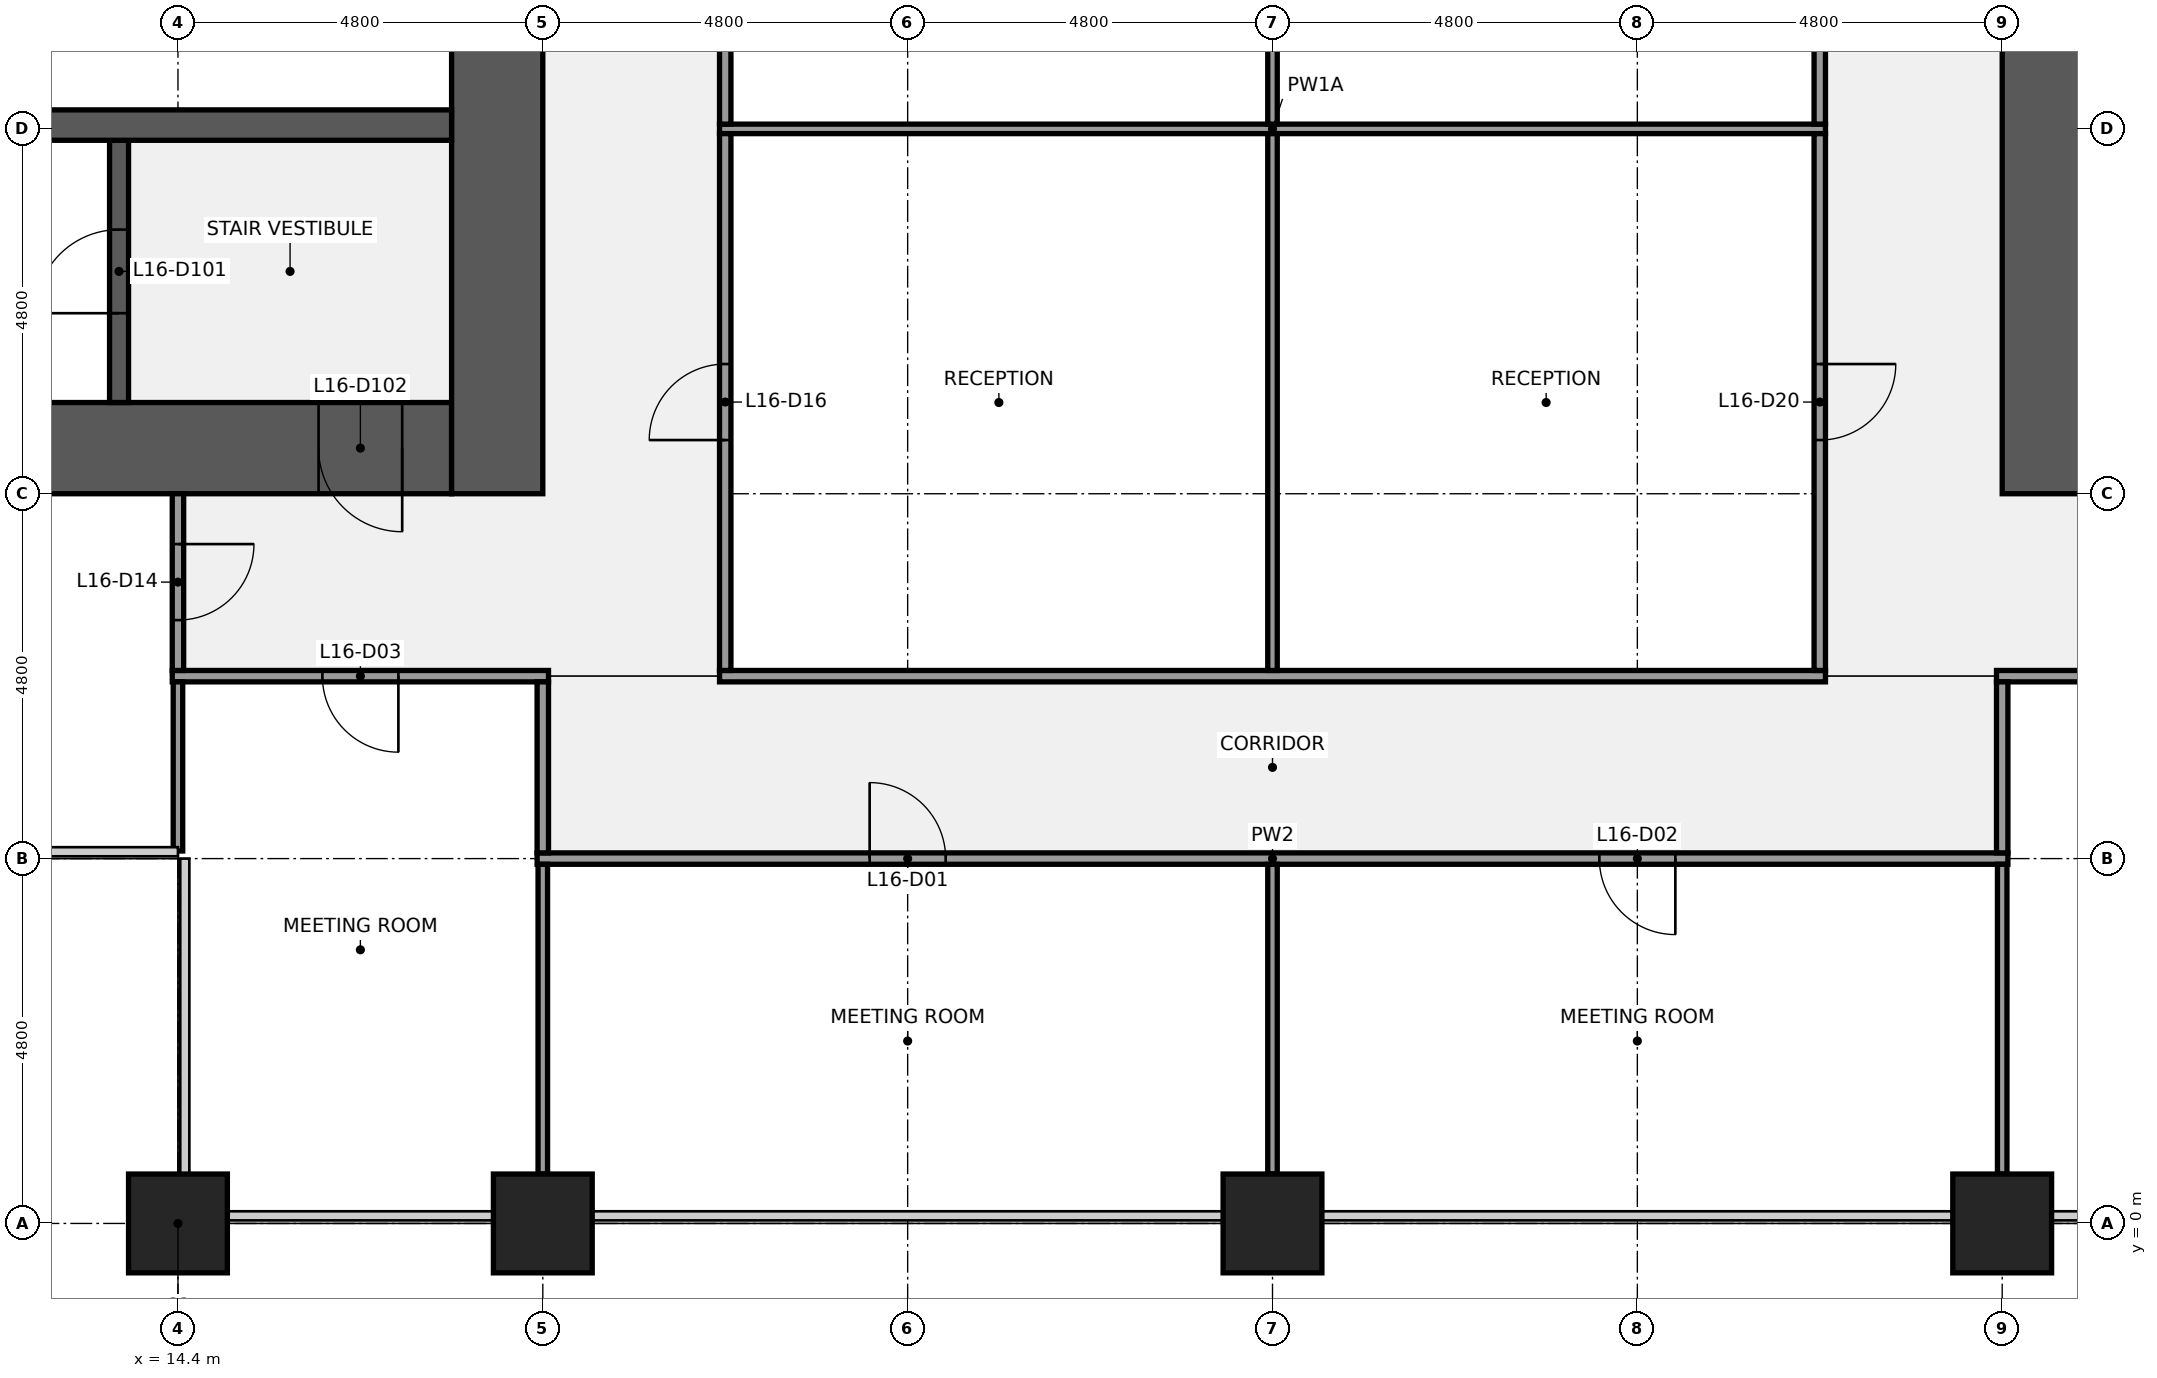
"""IFC4 building model, lengths in metres.
Left out: names, types, materials, properties, quantities, classifications, styles, units other than length and angle.
Written with IfcOpenShell. Run it as: python <this file> out.ifc"""

import sys

from ifc_helpers import new_model, si_unit, direction, frame, frame_2d, origin, origin_2d, place, context, subcontext, project, spatial, rectangle, extrude, element, fill, save


model = new_model("IFC4")
c1 = context("Model", 3, precision=1e-05, world=origin(), true_north=direction((0.0, 1.0)))
c2 = subcontext(c1, "Body", "Model", "MODEL_VIEW")
j1 = project(units=[si_unit("LENGTHUNIT", "METRE"), si_unit("PLANEANGLEUNIT", "RADIAN")], contexts=[c1])
p1 = place(None, origin())
s1 = spatial("IfcSite", under=j1, at=p1, CompositionType="ELEMENT")
p2 = place(p1, origin())
s2 = spatial("IfcBuilding", under=s1, at=p2, CompositionType="ELEMENT")
p3 = place(p2, frame((0.0, 0.0, 75.0)))
s3 = spatial("IfcBuildingStorey", under=s2, at=p3, CompositionType="ELEMENT", Elevation=75.0)
for number, where, z_axis, x_axis in (
    (1, (14.4, 0.0, 0.0), (0.0, 0.0, 1.0), (1.0, 0.0, 0.0)),
    (2, (19.2, 0.0, 0.0), (0.0, 0.0, 1.0), (1.0, 0.0, 0.0)),
    (3, (28.8, 0.0, 0.0), (0.0, 0.0, 1.0), (1.0, 0.0, 0.0)),
    (4, (38.4, 0.0, 0.0), (0.0, 0.0, 1.0), (1.0, 0.0, 0.0)),
):
    element("IfcColumn", number, at=place(p3, frame(where, z_axis=z_axis, x_axis=x_axis)), inside=s3, PredefinedType="COLUMN", context=c2, shape_type="SweptSolid", body=[
        extrude(rectangle(XDim=1.3, YDim=1.3, at=origin_2d()), origin(), (0.0, 0.0, 1.0), 4.0),
    ])
p4 = place(p3, frame((18.0, 10.2, 0.0), z_axis=(0.0, 0.0, 1.0), x_axis=(-1.0, 0.0, 0.0)))
e5 = element("IfcWall", 5, at=p4, inside=s3, PredefinedType="SHEAR", context=c2, shape_type="SweptSolid", body=[
    extrude(rectangle(XDim=13.2, YDim=1.2, at=frame_2d((6.6, 0.0))), origin(), (0.0, 0.0, 1.0), 3.84),
])
p5 = place(p4, frame((0.65, 0.0, 0.0)))
e6 = element("IfcOpeningElement", 6, at=p5, cuts=e5, PredefinedType="OPENING", context=c2, shape_type="SweptSolid", body=[
    extrude(rectangle(XDim=1.1, YDim=2.1, at=frame_2d((0.55, 1.05))), frame((0.0, 0.61, 0.0), z_axis=(0.0, -1.0, 0.0), x_axis=(1.0, 0.0, 0.0)), (0.0, 0.0, 1.0), 1.22),
])
p6 = place(p3, frame((18.6, 38.4, 0.0), z_axis=(0.0, 0.0, 1.0), x_axis=(0.0, -1.0, 0.0)))
e7 = element("IfcWall", 7, at=p6, inside=s3, PredefinedType="SHEAR", context=c2, shape_type="SweptSolid", body=[
    extrude(rectangle(XDim=28.8, YDim=1.2, at=frame_2d((14.4, 0.0))), origin(), (0.0, 0.0, 1.0), 3.84),
])
p7 = place(p6, frame((18.3, 0.0, 0.0)))
e8 = element("IfcOpeningElement", 8, at=p7, cuts=e7, PredefinedType="OPENING", context=c2, shape_type="SweptSolid", body=[
    extrude(rectangle(XDim=1.8, YDim=2.1, at=frame_2d((0.9, 1.05))), frame((0.0, 0.61, 0.0), z_axis=(0.0, -1.0, 0.0), x_axis=(1.0, 0.0, 0.0)), (0.0, 0.0, 1.0), 1.22),
])
p8 = place(p6, frame((8.7, 0.0, 0.0)))
e9 = element("IfcOpeningElement", 9, at=p8, cuts=e7, PredefinedType="OPENING", context=c2, shape_type="SweptSolid", body=[
    extrude(rectangle(XDim=1.8, YDim=2.1, at=frame_2d((0.9, 1.05))), frame((0.0, 0.61, 0.0), z_axis=(0.0, -1.0, 0.0), x_axis=(1.0, 0.0, 0.0)), (0.0, 0.0, 1.0), 1.22),
])
p9 = place(p3, frame((13.625, 10.8, 0.0), z_axis=(0.0, 0.0, 1.0), x_axis=(0.0, 1.0, 0.0)))
e10 = element("IfcWall", 10, at=p9, inside=s3, PredefinedType="SHEAR", context=c2, shape_type="SweptSolid", body=[
    extrude(rectangle(XDim=3.45, YDim=0.25, at=frame_2d((1.725, 0.0))), origin(), (0.0, 0.0, 1.0), 3.84),
])
p10 = place(p9, frame((1.175, 0.0, 0.0)))
e11 = element("IfcOpeningElement", 11, at=p10, cuts=e10, PredefinedType="OPENING", context=c2, shape_type="SweptSolid", body=[
    extrude(rectangle(XDim=1.1, YDim=2.1, at=frame_2d((0.55, 1.05))), frame((0.0, 0.135, 0.0), z_axis=(0.0, -1.0, 0.0), x_axis=(1.0, 0.0, 0.0)), (0.0, 0.0, 1.0), 0.27),
])
p11 = place(p3, frame((1.2, 14.45, 0.0), z_axis=(0.0, 0.0, 1.0), x_axis=(1.0, 0.0, 0.0)))
e12 = element("IfcWall", 12, at=p11, inside=s3, PredefinedType="SHEAR", context=c2, shape_type="SweptSolid", body=[
    extrude(rectangle(XDim=16.8, YDim=0.4, at=frame_2d((8.4, 0.0))), origin(), (0.0, 0.0, 1.0), 3.84),
])
p12 = place(p3, frame((39.0, 9.6, 0.0), z_axis=(0.0, 0.0, 1.0), x_axis=(0.0, 1.0, 0.0)))
e13 = element("IfcWall", 13, at=p12, inside=s3, PredefinedType="SHEAR", context=c2, shape_type="SweptSolid", body=[
    extrude(rectangle(XDim=28.8, YDim=1.2, at=frame_2d((14.4, 0.0))), origin(), (0.0, 0.0, 1.0), 3.84),
])
p13 = place(p12, frame((8.7, 0.0, 0.0)))
e14 = element("IfcOpeningElement", 14, at=p13, cuts=e13, PredefinedType="OPENING", context=c2, shape_type="SweptSolid", body=[
    extrude(rectangle(XDim=1.8, YDim=2.1, at=frame_2d((0.9, 1.05))), frame((0.0, 0.61, 0.0), z_axis=(0.0, -1.0, 0.0), x_axis=(1.0, 0.0, 0.0)), (0.0, 0.0, 1.0), 1.22),
])
p14 = place(p12, frame((18.3, 0.0, 0.0)))
e15 = element("IfcOpeningElement", 15, at=p14, cuts=e13, PredefinedType="OPENING", context=c2, shape_type="SweptSolid", body=[
    extrude(rectangle(XDim=1.8, YDim=2.1, at=frame_2d((0.9, 1.05))), frame((0.0, 0.61, 0.0), z_axis=(0.0, -1.0, 0.0), x_axis=(1.0, 0.0, 0.0)), (0.0, 0.0, 1.0), 1.22),
])
p15 = place(p3, frame((19.125, 4.8, 0.0), z_axis=(0.0, 0.0, 1.0), x_axis=(1.0, 0.0, 0.0)))
e16 = element("IfcWall", 16, at=p15, inside=s3, PredefinedType="PARTITIONING", context=c2, shape_type="SweptSolid", body=[
    extrude(rectangle(XDim=19.35, YDim=0.15, at=frame_2d((9.675, 0.0))), origin(), (0.0, 0.0, 1.0), 2.87),
])
p16 = place(p15, frame((4.375, 0.0, 0.0)))
e17 = element("IfcOpeningElement", 17, at=p16, cuts=e16, PredefinedType="OPENING", context=c2, shape_type="SweptSolid", body=[
    extrude(rectangle(XDim=1.0, YDim=2.1, at=frame_2d((0.5, 1.05))), frame((0.0, 0.085, 0.0), z_axis=(0.0, -1.0, 0.0), x_axis=(1.0, 0.0, 0.0)), (0.0, 0.0, 1.0), 0.17),
])
p17 = place(p15, frame((13.975, 0.0, 0.0)))
e18 = element("IfcOpeningElement", 18, at=p17, cuts=e16, PredefinedType="OPENING", context=c2, shape_type="SweptSolid", body=[
    extrude(rectangle(XDim=1.0, YDim=2.1, at=frame_2d((0.5, 1.05))), frame((0.0, 0.085, 0.0), z_axis=(0.0, -1.0, 0.0), x_axis=(1.0, 0.0, 0.0)), (0.0, 0.0, 1.0), 0.17),
])
p18 = place(p3, frame((14.325, 7.2, 0.0), z_axis=(0.0, 0.0, 1.0), x_axis=(1.0, 0.0, 0.0)))
e19 = element("IfcWall", 19, at=p18, inside=s3, PredefinedType="PARTITIONING", context=c2, shape_type="SweptSolid", body=[
    extrude(rectangle(XDim=4.95, YDim=0.15, at=frame_2d((2.475, 0.0))), origin(), (0.0, 0.0, 1.0), 2.87),
])
p19 = place(p18, frame((1.975, 0.0, 0.0)))
e20 = element("IfcOpeningElement", 20, at=p19, cuts=e19, PredefinedType="OPENING", context=c2, shape_type="SweptSolid", body=[
    extrude(rectangle(XDim=1.0, YDim=2.1, at=frame_2d((0.5, 1.05))), frame((0.0, 0.085, 0.0), z_axis=(0.0, -1.0, 0.0), x_axis=(1.0, 0.0, 0.0)), (0.0, 0.0, 1.0), 0.17),
])
p20 = place(p3, frame((21.525, 7.2, 0.0), z_axis=(0.0, 0.0, 1.0), x_axis=(1.0, 0.0, 0.0)))
e21 = element("IfcWall", 21, at=p20, inside=s3, PredefinedType="PARTITIONING", context=c2, shape_type="SweptSolid", body=[
    extrude(rectangle(XDim=14.55, YDim=0.15, at=frame_2d((7.275, 0.0))), origin(), (0.0, 0.0, 1.0), 2.87),
])
p21 = place(p3, frame((38.325, 7.2, 0.0), z_axis=(0.0, 0.0, 1.0), x_axis=(1.0, 0.0, 0.0)))
e22 = element("IfcWall", 22, at=p21, inside=s3, PredefinedType="PARTITIONING", context=c2, shape_type="SweptSolid", body=[
    extrude(rectangle(XDim=4.95, YDim=0.15, at=frame_2d((2.475, 0.0))), origin(), (0.0, 0.0, 1.0), 2.87),
])
p22 = place(p21, frame((1.975, 0.0, 0.0)))
e23 = element("IfcOpeningElement", 23, at=p22, cuts=e22, PredefinedType="OPENING", context=c2, shape_type="SweptSolid", body=[
    extrude(rectangle(XDim=1.0, YDim=2.1, at=frame_2d((0.5, 1.05))), frame((0.0, 0.085, 0.0), z_axis=(0.0, -1.0, 0.0), x_axis=(1.0, 0.0, 0.0)), (0.0, 0.0, 1.0), 0.17),
])
p23 = place(p3, frame((21.525, 14.4, 0.0), z_axis=(0.0, 0.0, 1.0), x_axis=(1.0, 0.0, 0.0)))
e24 = element("IfcWall", 24, at=p23, inside=s3, PredefinedType="PARTITIONING", context=c2, shape_type="SweptSolid", body=[
    extrude(rectangle(XDim=14.55, YDim=0.125, at=frame_2d((7.275, 0.0))), origin(), (0.0, 0.0, 1.0), 2.87),
])
p24 = place(p3, frame((14.4, 4.9, 0.0), z_axis=(0.0, 0.0, 1.0), x_axis=(0.0, 1.0, 0.0)))
e25 = element("IfcWall", 25, at=p24, inside=s3, PredefinedType="PARTITIONING", context=c2, shape_type="SweptSolid", body=[
    extrude(rectangle(XDim=2.225, YDim=0.125, at=frame_2d((1.113, 0.0))), origin(), (0.0, 0.0, 1.0), 2.87),
])
p25 = place(p3, frame((14.4, 7.275, 0.0), z_axis=(0.0, 0.0, 1.0), x_axis=(0.0, 1.0, 0.0)))
e26 = element("IfcWall", 26, at=p25, inside=s3, PredefinedType="PARTITIONING", context=c2, shape_type="SweptSolid", body=[
    extrude(rectangle(XDim=2.325, YDim=0.15, at=frame_2d((1.163, 0.0))), origin(), (0.0, 0.0, 1.0), 2.87),
])
p26 = place(p25, frame((0.663, 0.0, 0.0)))
e27 = element("IfcOpeningElement", 27, at=p26, cuts=e26, PredefinedType="OPENING", context=c2, shape_type="SweptSolid", body=[
    extrude(rectangle(XDim=1.0, YDim=2.1, at=frame_2d((0.5, 1.05))), frame((0.0, 0.085, 0.0), z_axis=(0.0, -1.0, 0.0), x_axis=(1.0, 0.0, 0.0)), (0.0, 0.0, 1.0), 0.17),
])
p27 = place(p3, frame((19.2, 0.65, 0.0), z_axis=(0.0, 0.0, 1.0), x_axis=(0.0, 1.0, 0.0)))
e28 = element("IfcWall", 28, at=p27, inside=s3, PredefinedType="PARTITIONING", context=c2, shape_type="SweptSolid", body=[
    extrude(rectangle(XDim=4.075, YDim=0.125, at=frame_2d((2.038, 0.0))), origin(), (0.0, 0.0, 1.0), 2.87),
])
p28 = place(p3, frame((19.2, 4.875, 0.0), z_axis=(0.0, 0.0, 1.0), x_axis=(0.0, 1.0, 0.0)))
e29 = element("IfcWall", 29, at=p28, inside=s3, PredefinedType="PARTITIONING", context=c2, shape_type="SweptSolid", body=[
    extrude(rectangle(XDim=2.25, YDim=0.15, at=frame_2d((1.125, 0.0))), origin(), (0.0, 0.0, 1.0), 2.87),
])
p29 = place(p3, frame((21.6, 7.275, 0.0), z_axis=(0.0, 0.0, 1.0), x_axis=(0.0, 1.0, 0.0)))
e30 = element("IfcWall", 30, at=p29, inside=s3, PredefinedType="PARTITIONING", context=c2, shape_type="SweptSolid", body=[
    extrude(rectangle(XDim=7.062, YDim=0.15, at=frame_2d((3.531, 0.0))), origin(), (0.0, 0.0, 1.0), 2.87),
])
p30 = place(p29, frame((3.031, 0.0, 0.0)))
e31 = element("IfcOpeningElement", 31, at=p30, cuts=e30, PredefinedType="OPENING", context=c2, shape_type="SweptSolid", body=[
    extrude(rectangle(XDim=1.0, YDim=2.1, at=frame_2d((0.5, 1.05))), frame((0.0, 0.085, 0.0), z_axis=(0.0, -1.0, 0.0), x_axis=(1.0, 0.0, 0.0)), (0.0, 0.0, 1.0), 0.17),
])
p31 = place(p3, frame((21.6, 14.462, 0.0), z_axis=(0.0, 0.0, 1.0), x_axis=(0.0, 1.0, 0.0)))
e32 = element("IfcWall", 32, at=p31, inside=s3, PredefinedType="PARTITIONING", context=c2, shape_type="SweptSolid", body=[
    extrude(rectangle(XDim=7.075, YDim=0.15, at=frame_2d((3.538, 0.0))), origin(), (0.0, 0.0, 1.0), 2.87),
])
p32 = place(p31, frame((3.038, 0.0, 0.0)))
e33 = element("IfcOpeningElement", 33, at=p32, cuts=e32, PredefinedType="OPENING", context=c2, shape_type="SweptSolid", body=[
    extrude(rectangle(XDim=1.0, YDim=2.1, at=frame_2d((0.5, 1.05))), frame((0.0, 0.085, 0.0), z_axis=(0.0, -1.0, 0.0), x_axis=(1.0, 0.0, 0.0)), (0.0, 0.0, 1.0), 0.17),
])
p33 = place(p3, frame((28.8, 0.65, 0.0), z_axis=(0.0, 0.0, 1.0), x_axis=(0.0, 1.0, 0.0)))
e34 = element("IfcWall", 34, at=p33, inside=s3, PredefinedType="PARTITIONING", context=c2, shape_type="SweptSolid", body=[
    extrude(rectangle(XDim=4.075, YDim=0.125, at=frame_2d((2.038, 0.0))), origin(), (0.0, 0.0, 1.0), 2.87),
])
p34 = place(p3, frame((28.8, 7.275, 0.0), z_axis=(0.0, 0.0, 1.0), x_axis=(0.0, 1.0, 0.0)))
e35 = element("IfcWall", 35, at=p34, inside=s3, PredefinedType="PARTITIONING", context=c2, shape_type="SweptSolid", body=[
    extrude(rectangle(XDim=7.062, YDim=0.125, at=frame_2d((3.531, 0.0))), origin(), (0.0, 0.0, 1.0), 2.87),
])
p35 = place(p3, frame((28.8, 14.462, 0.0), z_axis=(0.0, 0.0, 1.0), x_axis=(0.0, 1.0, 0.0)))
e36 = element("IfcWall", 36, at=p35, inside=s3, PredefinedType="PARTITIONING", context=c2, shape_type="SweptSolid", body=[
    extrude(rectangle(XDim=7.075, YDim=0.125, at=frame_2d((3.538, 0.0))), origin(), (0.0, 0.0, 1.0), 2.87),
])
p36 = place(p3, frame((36.0, 7.275, 0.0), z_axis=(0.0, 0.0, 1.0), x_axis=(0.0, 1.0, 0.0)))
e37 = element("IfcWall", 37, at=p36, inside=s3, PredefinedType="PARTITIONING", context=c2, shape_type="SweptSolid", body=[
    extrude(rectangle(XDim=7.062, YDim=0.15, at=frame_2d((3.531, 0.0))), origin(), (0.0, 0.0, 1.0), 2.87),
])
p37 = place(p36, frame((3.031, 0.0, 0.0)))
e38 = element("IfcOpeningElement", 38, at=p37, cuts=e37, PredefinedType="OPENING", context=c2, shape_type="SweptSolid", body=[
    extrude(rectangle(XDim=1.0, YDim=2.1, at=frame_2d((0.5, 1.05))), frame((0.0, 0.085, 0.0), z_axis=(0.0, -1.0, 0.0), x_axis=(1.0, 0.0, 0.0)), (0.0, 0.0, 1.0), 0.17),
])
p38 = place(p3, frame((36.0, 14.462, 0.0), z_axis=(0.0, 0.0, 1.0), x_axis=(0.0, 1.0, 0.0)))
e39 = element("IfcWall", 39, at=p38, inside=s3, PredefinedType="PARTITIONING", context=c2, shape_type="SweptSolid", body=[
    extrude(rectangle(XDim=7.075, YDim=0.15, at=frame_2d((3.538, 0.0))), origin(), (0.0, 0.0, 1.0), 2.87),
])
p39 = place(p38, frame((3.038, 0.0, 0.0)))
e40 = element("IfcOpeningElement", 40, at=p39, cuts=e39, PredefinedType="OPENING", context=c2, shape_type="SweptSolid", body=[
    extrude(rectangle(XDim=1.0, YDim=2.1, at=frame_2d((0.5, 1.05))), frame((0.0, 0.085, 0.0), z_axis=(0.0, -1.0, 0.0), x_axis=(1.0, 0.0, 0.0)), (0.0, 0.0, 1.0), 0.17),
])
p40 = place(p3, frame((38.4, 0.65, 0.0), z_axis=(0.0, 0.0, 1.0), x_axis=(0.0, 1.0, 0.0)))
e41 = element("IfcWall", 41, at=p40, inside=s3, PredefinedType="PARTITIONING", context=c2, shape_type="SweptSolid", body=[
    extrude(rectangle(XDim=4.075, YDim=0.125, at=frame_2d((2.038, 0.0))), origin(), (0.0, 0.0, 1.0), 2.87),
])
p41 = place(p3, frame((38.4, 4.875, 0.0), z_axis=(0.0, 0.0, 1.0), x_axis=(0.0, 1.0, 0.0)))
e42 = element("IfcWall", 42, at=p41, inside=s3, PredefinedType="PARTITIONING", context=c2, shape_type="SweptSolid", body=[
    extrude(rectangle(XDim=2.25, YDim=0.15, at=frame_2d((1.125, 0.0))), origin(), (0.0, 0.0, 1.0), 2.87),
])
for number, where, z_axis, x_axis in (
    (43, (14.4, -1.075, 0.0), (0.0, 0.0, 1.0), (1.0, 0.0, 0.0)),
    (44, (19.2, -1.075, 0.0), (0.0, 0.0, 1.0), (1.0, 0.0, 0.0)),
    (45, (38.4, -1.075, 0.0), (0.0, 0.0, 1.0), (1.0, 0.0, 0.0)),
):
    element("IfcColumn", number, at=place(p3, frame(where, z_axis=z_axis, x_axis=x_axis)), inside=s3, PredefinedType="PILASTER", context=c2, shape_type="SweptSolid", body=[
        extrude(rectangle(XDim=4.2, YDim=0.85, at=origin_2d()), origin(), (0.0, 0.0, 1.0), 4.0),
    ])
p42 = place(p10, origin())
e46 = element("IfcDoor", 46, at=p42, inside=s3, OperationType="SINGLE_SWING_LEFT", PredefinedType="DOOR", context=c2, shape_type="SweptSolid", body=[
    extrude(rectangle(XDim=1.1, YDim=2.1, at=frame_2d((0.55, 1.05))), frame((0.0, 0.025, 0.0), z_axis=(0.0, -1.0, 0.0), x_axis=(1.0, 0.0, 0.0)), (0.0, 0.0, 1.0), 0.05),
])
fill(e11, e46)
p43 = place(p5, origin())
e47 = element("IfcDoor", 47, at=p43, inside=s3, OperationType="SINGLE_SWING_LEFT", PredefinedType="DOOR", context=c2, shape_type="SweptSolid", body=[
    extrude(rectangle(XDim=1.1, YDim=2.1, at=frame_2d((0.55, 1.05))), frame((0.0, 0.025, 0.0), z_axis=(0.0, -1.0, 0.0), x_axis=(1.0, 0.0, 0.0)), (0.0, 0.0, 1.0), 0.05),
])
fill(e6, e47)
p44 = place(p16, origin())
e48 = element("IfcDoor", 48, at=p44, inside=s3, OperationType="SINGLE_SWING_LEFT", PredefinedType="DOOR", context=c2, shape_type="SweptSolid", body=[
    extrude(rectangle(XDim=1.0, YDim=2.1, at=frame_2d((0.5, 1.05))), frame((0.0, 0.025, 0.0), z_axis=(0.0, -1.0, 0.0), x_axis=(1.0, 0.0, 0.0)), (0.0, 0.0, 1.0), 0.05),
])
fill(e17, e48)
p45 = place(p17, origin())
e49 = element("IfcDoor", 49, at=p45, inside=s3, OperationType="SINGLE_SWING_RIGHT", PredefinedType="DOOR", context=c2, shape_type="SweptSolid", body=[
    extrude(rectangle(XDim=1.0, YDim=2.1, at=frame_2d((0.5, 1.05))), frame((0.0, 0.025, 0.0), z_axis=(0.0, -1.0, 0.0), x_axis=(1.0, 0.0, 0.0)), (0.0, 0.0, 1.0), 0.05),
])
fill(e18, e49)
p46 = place(p19, origin())
e50 = element("IfcDoor", 50, at=p46, inside=s3, OperationType="SINGLE_SWING_RIGHT", PredefinedType="DOOR", context=c2, shape_type="SweptSolid", body=[
    extrude(rectangle(XDim=1.0, YDim=2.1, at=frame_2d((0.5, 1.05))), frame((0.0, 0.025, 0.0), z_axis=(0.0, -1.0, 0.0), x_axis=(1.0, 0.0, 0.0)), (0.0, 0.0, 1.0), 0.05),
])
fill(e20, e50)
p47 = place(p26, origin())
e51 = element("IfcDoor", 51, at=p47, inside=s3, OperationType="SINGLE_SWING_RIGHT", PredefinedType="DOOR", context=c2, shape_type="SweptSolid", body=[
    extrude(rectangle(XDim=1.0, YDim=2.1, at=frame_2d((0.5, 1.05))), frame((0.0, 0.025, 0.0), z_axis=(0.0, -1.0, 0.0), x_axis=(1.0, 0.0, 0.0)), (0.0, 0.0, 1.0), 0.05),
])
fill(e27, e51)
p48 = place(p30, origin())
e52 = element("IfcDoor", 52, at=p48, inside=s3, OperationType="SINGLE_SWING_LEFT", PredefinedType="DOOR", context=c2, shape_type="SweptSolid", body=[
    extrude(rectangle(XDim=1.0, YDim=2.1, at=frame_2d((0.5, 1.05))), frame((0.0, 0.025, 0.0), z_axis=(0.0, -1.0, 0.0), x_axis=(1.0, 0.0, 0.0)), (0.0, 0.0, 1.0), 0.05),
])
fill(e31, e52)
p49 = place(p37, origin())
e53 = element("IfcDoor", 53, at=p49, inside=s3, OperationType="SINGLE_SWING_RIGHT", PredefinedType="DOOR", context=c2, shape_type="SweptSolid", body=[
    extrude(rectangle(XDim=1.0, YDim=2.1, at=frame_2d((0.5, 1.05))), frame((0.0, 0.025, 0.0), z_axis=(0.0, -1.0, 0.0), x_axis=(1.0, 0.0, 0.0)), (0.0, 0.0, 1.0), 0.05),
])
fill(e38, e53)
save(model, sys.argv[1])
